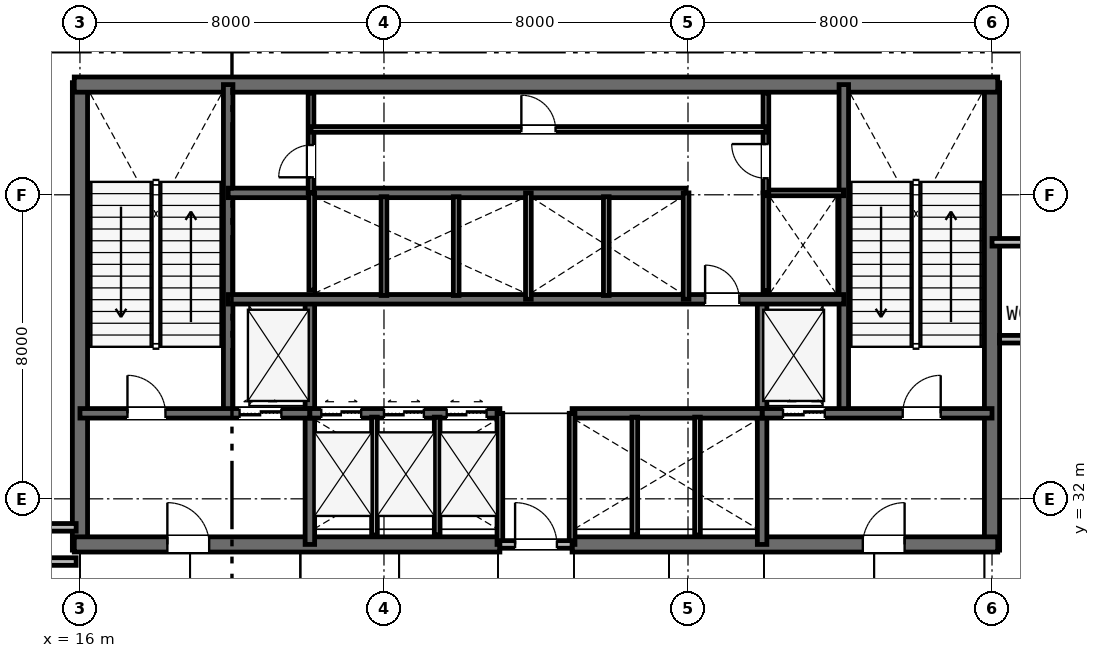
"""IFC4 building model, lengths in metres.
Left out: names, types, materials, properties, quantities, classifications, styles, units other than length and angle.
Written with IfcOpenShell. Run it as: python <this file> out.ifc"""

import sys

from ifc_helpers import new_model, si_unit, direction, frame, frame_2d, origin, place, context, subcontext, project, spatial, rectangle, extrude, element, fill, save


model = new_model("IFC4")
c1 = context("Model", 3, precision=1e-05, world=origin(), true_north=direction((0.0, 1.0)))
c2 = subcontext(c1, "Body", "Model", "MODEL_VIEW")
j1 = project(units=[si_unit("LENGTHUNIT", "METRE"), si_unit("PLANEANGLEUNIT", "RADIAN")], contexts=[c1])
p1 = place(None, origin())
s1 = spatial("IfcSite", under=j1, at=p1, CompositionType="ELEMENT")
p2 = place(p1, origin())
s2 = spatial("IfcBuilding", under=s1, at=p2, CompositionType="ELEMENT")
p3 = place(p2, frame((0.0, 0.0, 79.8)))
s3 = spatial("IfcBuildingStorey", under=s2, at=p3, CompositionType="ELEMENT", Elevation=79.8)
for number, where, z_axis, x_axis in (
    (1, (16.0, 30.65, 0.0), (0.0, 0.0, 1.0), (0.0, 1.0, 0.0)),
    (2, (40.0, 30.65, 0.0), (0.0, 0.0, 1.0), (0.0, 1.0, 0.0)),
):
    element("IfcWall", number, at=place(p3, frame(where, z_axis=z_axis, x_axis=x_axis)), inside=s3, PredefinedType="SHEAR", context=c2, shape_type="SweptSolid", body=[
        extrude(rectangle(XDim=12.3, YDim=0.4, at=frame_2d((6.15, 0.0))), origin(), (0.0, 0.0, 1.0), 4.8),
    ])
p4 = place(p3, frame((15.85, 42.9, 0.0), z_axis=(0.0, 0.0, 1.0), x_axis=(1.0, 0.0, 0.0)))
e3 = element("IfcWall", 3, at=p4, inside=s3, PredefinedType="SHEAR", context=c2, shape_type="SweptSolid", body=[
    extrude(rectangle(XDim=24.3, YDim=0.4, at=frame_2d((12.15, 0.0))), origin(), (0.0, 0.0, 1.0), 4.8),
])
p5 = place(p3, frame((15.85, 30.8, 0.0), z_axis=(0.0, 0.0, 1.0), x_axis=(1.0, 0.0, 0.0)))
e4 = element("IfcWall", 4, at=p5, inside=s3, PredefinedType="SHEAR", context=c2, shape_type="SweptSolid", body=[
    extrude(rectangle(XDim=11.2, YDim=0.4, at=frame_2d((5.6, 0.0))), origin(), (0.0, 0.0, 1.0), 4.8),
])
p6 = place(p5, frame((2.45, 0.0, 0.0)))
e5 = element("IfcOpeningElement", 5, at=p6, cuts=e4, PredefinedType="OPENING", context=c2, shape_type="SweptSolid", body=[
    extrude(rectangle(XDim=1.1, YDim=2.15, at=frame_2d((0.55, 1.075))), frame((0.0, 0.21, 0.0), z_axis=(0.0, -1.0, 0.0), x_axis=(1.0, 0.0, 0.0)), (0.0, 0.0, 1.0), 0.42),
])
p7 = place(p3, frame((28.95, 30.8, 0.0), z_axis=(0.0, 0.0, 1.0), x_axis=(1.0, 0.0, 0.0)))
e6 = element("IfcWall", 6, at=p7, inside=s3, PredefinedType="SHEAR", context=c2, shape_type="SweptSolid", body=[
    extrude(rectangle(XDim=11.2, YDim=0.4, at=frame_2d((5.6, 0.0))), origin(), (0.0, 0.0, 1.0), 4.8),
])
p8 = place(p7, frame((7.65, 0.0, 0.0)))
e7 = element("IfcOpeningElement", 7, at=p8, cuts=e6, PredefinedType="OPENING", context=c2, shape_type="SweptSolid", body=[
    extrude(rectangle(XDim=1.1, YDim=2.15, at=frame_2d((0.55, 1.075))), frame((0.0, 0.21, 0.0), z_axis=(0.0, -1.0, 0.0), x_axis=(1.0, 0.0, 0.0)), (0.0, 0.0, 1.0), 0.42),
])
for number, where, z_axis, x_axis in (
    (8, (19.9, 34.25, 0.0), (0.0, 0.0, 1.0), (0.0, 1.0, 0.0)),
    (9, (36.1, 34.25, 0.0), (0.0, 0.0, 1.0), (0.0, 1.0, 0.0)),
):
    element("IfcWall", number, at=place(p3, frame(where, z_axis=z_axis, x_axis=x_axis)), inside=s3, PredefinedType="SHEAR", context=c2, shape_type="SweptSolid", body=[
        extrude(rectangle(XDim=8.65, YDim=0.25, at=frame_2d((4.325, 0.0))), origin(), (0.0, 0.0, 1.0), 4.8),
    ])
for number, where, z_axis, x_axis in (
    (10, (22.05, 30.8, 0.0), (0.0, 0.0, 1.0), (0.0, 1.0, 0.0)),
    (11, (33.95, 30.8, 0.0), (0.0, 0.0, 1.0), (0.0, 1.0, 0.0)),
):
    element("IfcWall", number, at=place(p3, frame(where, z_axis=z_axis, x_axis=x_axis)), inside=s3, PredefinedType="SHEAR", context=c2, shape_type="SweptSolid", body=[
        extrude(rectangle(XDim=6.45, YDim=0.25, at=frame_2d((3.225, 0.0))), origin(), (0.0, 0.0, 1.0), 4.8),
    ])
p9 = place(p3, frame((16.0, 34.25, 0.0), z_axis=(0.0, 0.0, 1.0), x_axis=(1.0, 0.0, 0.0)))
e12 = element("IfcWall", 12, at=p9, inside=s3, PredefinedType="SHEAR", context=c2, shape_type="SweptSolid", body=[
    extrude(rectangle(XDim=6.05, YDim=0.25, at=frame_2d((3.025, 0.0))), origin(), (0.0, 0.0, 1.0), 4.8),
])
p10 = place(p9, frame((1.25, 0.0, 0.0)))
e13 = element("IfcOpeningElement", 13, at=p10, cuts=e12, PredefinedType="OPENING", context=c2, shape_type="SweptSolid", body=[
    extrude(rectangle(XDim=1.0, YDim=2.15, at=frame_2d((0.5, 1.075))), frame((0.0, 0.135, 0.0), z_axis=(0.0, -1.0, 0.0), x_axis=(1.0, 0.0, 0.0)), (0.0, 0.0, 1.0), 0.27),
])
p11 = place(p9, frame((4.2, 0.0, 0.0)))
e14 = element("IfcOpeningElement", 14, at=p11, cuts=e12, PredefinedType="OPENING", context=c2, shape_type="SweptSolid", body=[
    extrude(rectangle(XDim=1.1, YDim=2.15, at=frame_2d((0.55, 1.075))), frame((0.0, 0.135, 0.0), z_axis=(0.0, -1.0, 0.0), x_axis=(1.0, 0.0, 0.0)), (0.0, 0.0, 1.0), 0.27),
])
p12 = place(p3, frame((33.95, 34.25, 0.0), z_axis=(0.0, 0.0, 1.0), x_axis=(1.0, 0.0, 0.0)))
e15 = element("IfcWall", 15, at=p12, inside=s3, PredefinedType="SHEAR", context=c2, shape_type="SweptSolid", body=[
    extrude(rectangle(XDim=6.05, YDim=0.25, at=frame_2d((3.025, 0.0))), origin(), (0.0, 0.0, 1.0), 4.8),
])
p13 = place(p12, frame((3.7, 0.0, 0.0)))
e16 = element("IfcOpeningElement", 16, at=p13, cuts=e15, PredefinedType="OPENING", context=c2, shape_type="SweptSolid", body=[
    extrude(rectangle(XDim=1.0, YDim=2.15, at=frame_2d((0.5, 1.075))), frame((0.0, 0.135, 0.0), z_axis=(0.0, -1.0, 0.0), x_axis=(1.0, 0.0, 0.0)), (0.0, 0.0, 1.0), 0.27),
])
p14 = place(p12, frame((0.55, 0.0, 0.0)))
e17 = element("IfcOpeningElement", 17, at=p14, cuts=e15, PredefinedType="OPENING", context=c2, shape_type="SweptSolid", body=[
    extrude(rectangle(XDim=1.1, YDim=2.15, at=frame_2d((0.55, 1.075))), frame((0.0, 0.135, 0.0), z_axis=(0.0, -1.0, 0.0), x_axis=(1.0, 0.0, 0.0)), (0.0, 0.0, 1.0), 0.27),
])
p15 = place(p3, frame((22.05, 34.25, 0.0), z_axis=(0.0, 0.0, 1.0), x_axis=(1.0, 0.0, 0.0)))
e18 = element("IfcWall", 18, at=p15, inside=s3, PredefinedType="SHEAR", context=c2, shape_type="SweptSolid", body=[
    extrude(rectangle(XDim=5.0, YDim=0.25, at=frame_2d((2.5, 0.0))), origin(), (0.0, 0.0, 1.0), 4.8),
])
p16 = place(p15, frame((0.3, 0.0, 0.0)))
e19 = element("IfcOpeningElement", 19, at=p16, cuts=e18, PredefinedType="OPENING", context=c2, shape_type="SweptSolid", body=[
    extrude(rectangle(XDim=1.05, YDim=2.15, at=frame_2d((0.525, 1.075))), frame((0.0, 0.135, 0.0), z_axis=(0.0, -1.0, 0.0), x_axis=(1.0, 0.0, 0.0)), (0.0, 0.0, 1.0), 0.27),
])
p17 = place(p15, frame((1.95, 0.0, 0.0)))
e20 = element("IfcOpeningElement", 20, at=p17, cuts=e18, PredefinedType="OPENING", context=c2, shape_type="SweptSolid", body=[
    extrude(rectangle(XDim=1.05, YDim=2.15, at=frame_2d((0.525, 1.075))), frame((0.0, 0.135, 0.0), z_axis=(0.0, -1.0, 0.0), x_axis=(1.0, 0.0, 0.0)), (0.0, 0.0, 1.0), 0.27),
])
p18 = place(p15, frame((3.6, 0.0, 0.0)))
e21 = element("IfcOpeningElement", 21, at=p18, cuts=e18, PredefinedType="OPENING", context=c2, shape_type="SweptSolid", body=[
    extrude(rectangle(XDim=1.05, YDim=2.15, at=frame_2d((0.525, 1.075))), frame((0.0, 0.135, 0.0), z_axis=(0.0, -1.0, 0.0), x_axis=(1.0, 0.0, 0.0)), (0.0, 0.0, 1.0), 0.27),
])
p19 = place(p3, frame((28.95, 34.25, 0.0), z_axis=(0.0, 0.0, 1.0), x_axis=(1.0, 0.0, 0.0)))
e22 = element("IfcWall", 22, at=p19, inside=s3, PredefinedType="SHEAR", context=c2, shape_type="SweptSolid", body=[
    extrude(rectangle(XDim=5.0, YDim=0.25, at=frame_2d((2.5, 0.0))), origin(), (0.0, 0.0, 1.0), 4.8),
])
p20 = place(p3, frame((19.9, 37.25, 0.0), z_axis=(0.0, 0.0, 1.0), x_axis=(1.0, 0.0, 0.0)))
e23 = element("IfcWall", 23, at=p20, inside=s3, PredefinedType="SHEAR", context=c2, shape_type="SweptSolid", body=[
    extrude(rectangle(XDim=16.2, YDim=0.25, at=frame_2d((8.1, 0.0))), origin(), (0.0, 0.0, 1.0), 4.8),
])
p21 = place(p20, frame((12.55, 0.0, 0.0)))
e24 = element("IfcOpeningElement", 24, at=p21, cuts=e23, PredefinedType="OPENING", context=c2, shape_type="SweptSolid", body=[
    extrude(rectangle(XDim=0.9, YDim=2.15, at=frame_2d((0.45, 1.075))), frame((0.0, 0.135, 0.0), z_axis=(0.0, -1.0, 0.0), x_axis=(1.0, 0.0, 0.0)), (0.0, 0.0, 1.0), 0.27),
])
p22 = place(p3, frame((19.9, 40.05, 0.0), z_axis=(0.0, 0.0, 1.0), x_axis=(1.0, 0.0, 0.0)))
e25 = element("IfcWall", 25, at=p22, inside=s3, PredefinedType="SHEAR", context=c2, shape_type="SweptSolid", body=[
    extrude(rectangle(XDim=12.05, YDim=0.25, at=frame_2d((6.025, 0.0))), origin(), (0.0, 0.0, 1.0), 4.8),
])
for number, where, z_axis, x_axis in (
    (26, (27.05, 30.8, 0.0), (0.0, 0.0, 1.0), (0.0, 1.0, 0.0)),
    (27, (28.95, 30.8, 0.0), (0.0, 0.0, 1.0), (0.0, 1.0, 0.0)),
):
    element("IfcWall", number, at=place(p3, frame(where, z_axis=z_axis, x_axis=x_axis)), inside=s3, PredefinedType="PLUMBINGWALL", context=c2, shape_type="SweptSolid", body=[
        extrude(rectangle(XDim=3.45, YDim=0.15, at=frame_2d((1.725, 0.0))), origin(), (0.0, 0.0, 1.0), 4.02),
    ])
p23 = place(p3, frame((27.05, 30.8, 0.0), z_axis=(0.0, 0.0, 1.0), x_axis=(1.0, 0.0, 0.0)))
e28 = element("IfcWall", 28, at=p23, inside=s3, PredefinedType="PARTITIONING", context=c2, shape_type="SweptSolid", body=[
    extrude(rectangle(XDim=1.9, YDim=0.2, at=frame_2d((0.95, 0.0))), origin(), (0.0, 0.0, 1.0), 4.02),
])
p24 = place(p23, frame((0.4, 0.0, 0.0)))
e29 = element("IfcOpeningElement", 29, at=p24, cuts=e28, PredefinedType="OPENING", context=c2, shape_type="SweptSolid", body=[
    extrude(rectangle(XDim=1.1, YDim=2.15, at=frame_2d((0.55, 1.075))), frame((0.0, 0.11, 0.0), z_axis=(0.0, -1.0, 0.0), x_axis=(1.0, 0.0, 0.0)), (0.0, 0.0, 1.0), 0.22),
])
for number, where, z_axis, x_axis in (
    (30, (23.75, 31.05, 0.0), (0.0, 0.0, 1.0), (0.0, 1.0, 0.0)),
    (31, (25.4, 31.05, 0.0), (0.0, 0.0, 1.0), (0.0, 1.0, 0.0)),
    (32, (30.6, 31.05, 0.0), (0.0, 0.0, 1.0), (0.0, 1.0, 0.0)),
    (33, (32.25, 31.05, 0.0), (0.0, 0.0, 1.0), (0.0, 1.0, 0.0)),
):
    element("IfcWall", number, at=place(p3, frame(where, z_axis=z_axis, x_axis=x_axis)), inside=s3, PredefinedType="PLUMBINGWALL", context=c2, shape_type="SweptSolid", body=[
        extrude(rectangle(XDim=3.1, YDim=0.15, at=frame_2d((1.55, 0.0))), origin(), (0.0, 0.0, 1.0), 4.02),
    ])
p25 = place(p3, frame((22.1, 37.49, 0.0), z_axis=(0.0, 0.0, 1.0), x_axis=(0.0, 1.0, 0.0)))
e34 = element("IfcWall", 34, at=p25, inside=s3, PredefinedType="PLUMBINGWALL", context=c2, shape_type="SweptSolid", body=[
    extrude(rectangle(XDim=2.56, YDim=0.15, at=frame_2d((1.28, 0.0))), origin(), (0.0, 0.0, 1.0), 4.02),
])
p26 = place(p3, frame((27.8, 37.25, 0.0), z_axis=(0.0, 0.0, 1.0), x_axis=(0.0, 1.0, 0.0)))
e35 = element("IfcWall", 35, at=p26, inside=s3, PredefinedType="PLUMBINGWALL", context=c2, shape_type="SweptSolid", body=[
    extrude(rectangle(XDim=2.8, YDim=0.15, at=frame_2d((1.4, 0.0))), origin(), (0.0, 0.0, 1.0), 4.02),
])
for number, where, z_axis, x_axis in (
    (36, (24.0, 37.35, 0.0), (0.0, 0.0, 1.0), (0.0, 1.0, 0.0)),
    (37, (25.9, 37.35, 0.0), (0.0, 0.0, 1.0), (0.0, 1.0, 0.0)),
):
    element("IfcWall", number, at=place(p3, frame(where, z_axis=z_axis, x_axis=x_axis)), inside=s3, PredefinedType="PLUMBINGWALL", context=c2, shape_type="SweptSolid", body=[
        extrude(rectangle(XDim=2.6, YDim=0.15, at=frame_2d((1.3, 0.0))), origin(), (0.0, 0.0, 1.0), 4.02),
    ])
p27 = place(p3, frame((31.95, 37.25, 0.0), z_axis=(0.0, 0.0, 1.0), x_axis=(0.0, 1.0, 0.0)))
e38 = element("IfcWall", 38, at=p27, inside=s3, PredefinedType="PLUMBINGWALL", context=c2, shape_type="SweptSolid", body=[
    extrude(rectangle(XDim=2.8, YDim=0.15, at=frame_2d((1.4, 0.0))), origin(), (0.0, 0.0, 1.0), 4.02),
])
p28 = place(p3, frame((29.85, 37.35, 0.0), z_axis=(0.0, 0.0, 1.0), x_axis=(0.0, 1.0, 0.0)))
e39 = element("IfcWall", 39, at=p28, inside=s3, PredefinedType="PLUMBINGWALL", context=c2, shape_type="SweptSolid", body=[
    extrude(rectangle(XDim=2.6, YDim=0.15, at=frame_2d((1.3, 0.0))), origin(), (0.0, 0.0, 1.0), 4.02),
])
p29 = place(p3, frame((34.05, 37.473, 0.0), z_axis=(0.0, 0.0, 1.0), x_axis=(0.0, 1.0, 0.0)))
e40 = element("IfcWall", 40, at=p29, inside=s3, PredefinedType="PLUMBINGWALL", context=c2, shape_type="SweptSolid", body=[
    extrude(rectangle(XDim=2.577, YDim=0.15, at=frame_2d((1.288, 0.0))), origin(), (0.0, 0.0, 1.0), 4.02),
])
p30 = place(p3, frame((34.05, 40.05, 0.0), z_axis=(0.0, 0.0, 1.0), x_axis=(1.0, 0.0, 0.0)))
e41 = element("IfcWall", 41, at=p30, inside=s3, PredefinedType="PARTITIONING", context=c2, shape_type="SweptSolid", body=[
    extrude(rectangle(XDim=2.05, YDim=0.15, at=frame_2d((1.025, 0.0))), origin(), (0.0, 0.0, 1.0), 4.02),
])
p31 = place(p3, frame((34.05, 40.05, 0.0), z_axis=(0.0, 0.0, 1.0), x_axis=(0.0, 1.0, 0.0)))
e42 = element("IfcWall", 42, at=p31, inside=s3, PredefinedType="PARTITIONING", context=c2, shape_type="SweptSolid", body=[
    extrude(rectangle(XDim=2.63, YDim=0.15, at=frame_2d((1.315, 0.0))), origin(), (0.0, 0.0, 1.0), 4.02),
])
p32 = place(p31, frame((0.385, 0.0, 0.0)))
e43 = element("IfcOpeningElement", 43, at=p32, cuts=e42, PredefinedType="OPENING", context=c2, shape_type="SweptSolid", body=[
    extrude(rectangle(XDim=0.9, YDim=2.15, at=frame_2d((0.45, 1.075))), frame((0.0, 0.085, 0.0), z_axis=(0.0, -1.0, 0.0), x_axis=(1.0, 0.0, 0.0)), (0.0, 0.0, 1.0), 0.17),
])
p33 = place(p3, frame((22.08, 40.05, 0.0), z_axis=(0.0, 0.0, 1.0), x_axis=(0.0, 1.0, 0.0)))
e44 = element("IfcWall", 44, at=p33, inside=s3, PredefinedType="PARTITIONING", context=c2, shape_type="SweptSolid", body=[
    extrude(rectangle(XDim=2.63, YDim=0.15, at=frame_2d((1.315, 0.0))), origin(), (0.0, 0.0, 1.0), 4.02),
])
p34 = place(p33, frame((0.41, 0.0, 0.0)))
e45 = element("IfcOpeningElement", 45, at=p34, cuts=e44, PredefinedType="OPENING", context=c2, shape_type="SweptSolid", body=[
    extrude(rectangle(XDim=0.85, YDim=2.15, at=frame_2d((0.425, 1.075))), frame((0.0, 0.085, 0.0), z_axis=(0.0, -1.0, 0.0), x_axis=(1.0, 0.0, 0.0)), (0.0, 0.0, 1.0), 0.17),
])
p35 = place(p3, frame((22.08, 41.72, 0.0), z_axis=(0.0, 0.0, 1.0), x_axis=(1.0, 0.0, 0.0)))
e46 = element("IfcWall", 46, at=p35, inside=s3, PredefinedType="PARTITIONING", context=c2, shape_type="SweptSolid", body=[
    extrude(rectangle(XDim=11.97, YDim=0.15, at=frame_2d((5.985, 0.0))), origin(), (0.0, 0.0, 1.0), 4.02),
])
p36 = place(p35, frame((5.535, 0.0, 0.0)))
e47 = element("IfcOpeningElement", 47, at=p36, cuts=e46, PredefinedType="OPENING", context=c2, shape_type="SweptSolid", body=[
    extrude(rectangle(XDim=0.9, YDim=2.15, at=frame_2d((0.45, 1.075))), frame((0.0, 0.085, 0.0), z_axis=(0.0, -1.0, 0.0), x_axis=(1.0, 0.0, 0.0)), (0.0, 0.0, 1.0), 0.17),
])
for number, where, z_axis, x_axis in (
    (48, (0.1, 30.35, 0.0), (0.0, 0.0, 1.0), (1.0, 0.0, 0.0)),
    (49, (0.1, 31.25, 0.0), (0.0, 0.0, 1.0), (1.0, 0.0, 0.0)),
):
    element("IfcWall", number, at=place(p3, frame(where, z_axis=z_axis, x_axis=x_axis)), inside=s3, PredefinedType="PARTITIONING", context=c2, shape_type="SweptSolid", body=[
        extrude(rectangle(XDim=15.8, YDim=0.2, at=frame_2d((7.9, 0.0))), origin(), (0.0, 0.0, 1.0), 3.94),
    ])
p37 = place(p3, frame((40.0, 38.75, 0.0), z_axis=(0.0, 0.0, 1.0), x_axis=(1.0, 0.0, 0.0)))
e50 = element("IfcWall", 50, at=p37, inside=s3, PredefinedType="PARTITIONING", context=c2, shape_type="SweptSolid", body=[
    extrude(rectangle(XDim=15.9, YDim=0.2, at=frame_2d((7.95, 0.0))), origin(), (0.0, 0.0, 1.0), 3.94),
])
p38 = place(p3, frame((40.2, 36.2, 0.0), z_axis=(0.0, 0.0, 1.0), x_axis=(1.0, 0.0, 0.0)))
e51 = element("IfcWall", 51, at=p38, inside=s3, PredefinedType="PARTITIONING", context=c2, shape_type="SweptSolid", body=[
    extrude(rectangle(XDim=2.2, YDim=0.2, at=frame_2d((1.1, 0.0))), origin(), (0.0, 0.0, 1.0), 4.02),
])
p39 = place(p24, origin())
e52 = element("IfcDoor", 52, at=p39, inside=s3, OperationType="SINGLE_SWING_LEFT", PredefinedType="DOOR", context=c2, shape_type="SweptSolid", body=[
    extrude(rectangle(XDim=1.1, YDim=2.15, at=frame_2d((0.55, 1.075))), frame((0.0, 0.025, 0.0), z_axis=(0.0, -1.0, 0.0), x_axis=(1.0, 0.0, 0.0)), (0.0, 0.0, 1.0), 0.05),
])
fill(e29, e52)
p40 = place(p10, origin())
e53 = element("IfcDoor", 53, at=p40, inside=s3, OperationType="SINGLE_SWING_LEFT", PredefinedType="DOOR", context=c2, shape_type="SweptSolid", body=[
    extrude(rectangle(XDim=1.0, YDim=2.15, at=frame_2d((0.5, 1.075))), frame((0.0, 0.025, 0.0), z_axis=(0.0, -1.0, 0.0), x_axis=(1.0, 0.0, 0.0)), (0.0, 0.0, 1.0), 0.05),
])
fill(e13, e53)
p41 = place(p13, origin())
e54 = element("IfcDoor", 54, at=p41, inside=s3, OperationType="SINGLE_SWING_RIGHT", PredefinedType="DOOR", context=c2, shape_type="SweptSolid", body=[
    extrude(rectangle(XDim=1.0, YDim=2.15, at=frame_2d((0.5, 1.075))), frame((0.0, 0.025, 0.0), z_axis=(0.0, -1.0, 0.0), x_axis=(1.0, 0.0, 0.0)), (0.0, 0.0, 1.0), 0.05),
])
fill(e16, e54)
p42 = place(p6, origin())
e55 = element("IfcDoor", 55, at=p42, inside=s3, OperationType="SINGLE_SWING_LEFT", PredefinedType="DOOR", context=c2, shape_type="SweptSolid", body=[
    extrude(rectangle(XDim=1.1, YDim=2.15, at=frame_2d((0.55, 1.075))), frame((0.0, 0.025, 0.0), z_axis=(0.0, -1.0, 0.0), x_axis=(1.0, 0.0, 0.0)), (0.0, 0.0, 1.0), 0.05),
])
fill(e5, e55)
p43 = place(p8, origin())
e56 = element("IfcDoor", 56, at=p43, inside=s3, OperationType="SINGLE_SWING_RIGHT", PredefinedType="DOOR", context=c2, shape_type="SweptSolid", body=[
    extrude(rectangle(XDim=1.1, YDim=2.15, at=frame_2d((0.55, 1.075))), frame((0.0, 0.025, 0.0), z_axis=(0.0, -1.0, 0.0), x_axis=(1.0, 0.0, 0.0)), (0.0, 0.0, 1.0), 0.05),
])
fill(e7, e56)
p44 = place(p21, origin())
e57 = element("IfcDoor", 57, at=p44, inside=s3, OperationType="SINGLE_SWING_LEFT", PredefinedType="DOOR", context=c2, shape_type="SweptSolid", body=[
    extrude(rectangle(XDim=0.9, YDim=2.15, at=frame_2d((0.45, 1.075))), frame((0.0, 0.025, 0.0), z_axis=(0.0, -1.0, 0.0), x_axis=(1.0, 0.0, 0.0)), (0.0, 0.0, 1.0), 0.05),
])
fill(e24, e57)
p45 = place(p32, origin())
e58 = element("IfcDoor", 58, at=p45, inside=s3, OperationType="SINGLE_SWING_RIGHT", PredefinedType="DOOR", context=c2, shape_type="SweptSolid", body=[
    extrude(rectangle(XDim=0.9, YDim=2.15, at=frame_2d((0.45, 1.075))), frame((0.0, 0.025, 0.0), z_axis=(0.0, -1.0, 0.0), x_axis=(1.0, 0.0, 0.0)), (0.0, 0.0, 1.0), 0.05),
])
fill(e43, e58)
p46 = place(p34, origin())
e59 = element("IfcDoor", 59, at=p46, inside=s3, OperationType="SINGLE_SWING_LEFT", PredefinedType="DOOR", context=c2, shape_type="SweptSolid", body=[
    extrude(rectangle(XDim=0.85, YDim=2.15, at=frame_2d((0.425, 1.075))), frame((0.0, 0.025, 0.0), z_axis=(0.0, -1.0, 0.0), x_axis=(1.0, 0.0, 0.0)), (0.0, 0.0, 1.0), 0.05),
])
fill(e45, e59)
p47 = place(p36, origin())
e60 = element("IfcDoor", 60, at=p47, inside=s3, OperationType="SINGLE_SWING_LEFT", PredefinedType="DOOR", context=c2, shape_type="SweptSolid", body=[
    extrude(rectangle(XDim=0.9, YDim=2.15, at=frame_2d((0.45, 1.075))), frame((0.0, 0.025, 0.0), z_axis=(0.0, -1.0, 0.0), x_axis=(1.0, 0.0, 0.0)), (0.0, 0.0, 1.0), 0.05),
])
fill(e47, e60)
p48 = place(p11, origin())
e61 = element("IfcDoor", 61, at=p48, inside=s3, OperationType="DOUBLE_DOOR_SLIDING", PredefinedType="DOOR", context=c2, shape_type="SweptSolid", body=[
    extrude(rectangle(XDim=1.1, YDim=2.15, at=frame_2d((0.55, 1.075))), frame((0.0, 0.025, 0.0), z_axis=(0.0, -1.0, 0.0), x_axis=(1.0, 0.0, 0.0)), (0.0, 0.0, 1.0), 0.05),
])
fill(e14, e61)
p49 = place(p14, origin())
e62 = element("IfcDoor", 62, at=p49, inside=s3, OperationType="DOUBLE_DOOR_SLIDING", PredefinedType="DOOR", context=c2, shape_type="SweptSolid", body=[
    extrude(rectangle(XDim=1.1, YDim=2.15, at=frame_2d((0.55, 1.075))), frame((0.0, 0.025, 0.0), z_axis=(0.0, -1.0, 0.0), x_axis=(1.0, 0.0, 0.0)), (0.0, 0.0, 1.0), 0.05),
])
fill(e17, e62)
p50 = place(p16, origin())
e63 = element("IfcDoor", 63, at=p50, inside=s3, OperationType="DOUBLE_DOOR_SLIDING", PredefinedType="DOOR", context=c2, shape_type="SweptSolid", body=[
    extrude(rectangle(XDim=1.05, YDim=2.15, at=frame_2d((0.525, 1.075))), frame((0.0, 0.025, 0.0), z_axis=(0.0, -1.0, 0.0), x_axis=(1.0, 0.0, 0.0)), (0.0, 0.0, 1.0), 0.05),
])
fill(e19, e63)
p51 = place(p17, origin())
e64 = element("IfcDoor", 64, at=p51, inside=s3, OperationType="DOUBLE_DOOR_SLIDING", PredefinedType="DOOR", context=c2, shape_type="SweptSolid", body=[
    extrude(rectangle(XDim=1.05, YDim=2.15, at=frame_2d((0.525, 1.075))), frame((0.0, 0.025, 0.0), z_axis=(0.0, -1.0, 0.0), x_axis=(1.0, 0.0, 0.0)), (0.0, 0.0, 1.0), 0.05),
])
fill(e20, e64)
p52 = place(p18, origin())
e65 = element("IfcDoor", 65, at=p52, inside=s3, OperationType="DOUBLE_DOOR_SLIDING", PredefinedType="DOOR", context=c2, shape_type="SweptSolid", body=[
    extrude(rectangle(XDim=1.05, YDim=2.15, at=frame_2d((0.525, 1.075))), frame((0.0, 0.025, 0.0), z_axis=(0.0, -1.0, 0.0), x_axis=(1.0, 0.0, 0.0)), (0.0, 0.0, 1.0), 0.05),
])
fill(e21, e65)
save(model, sys.argv[1])
